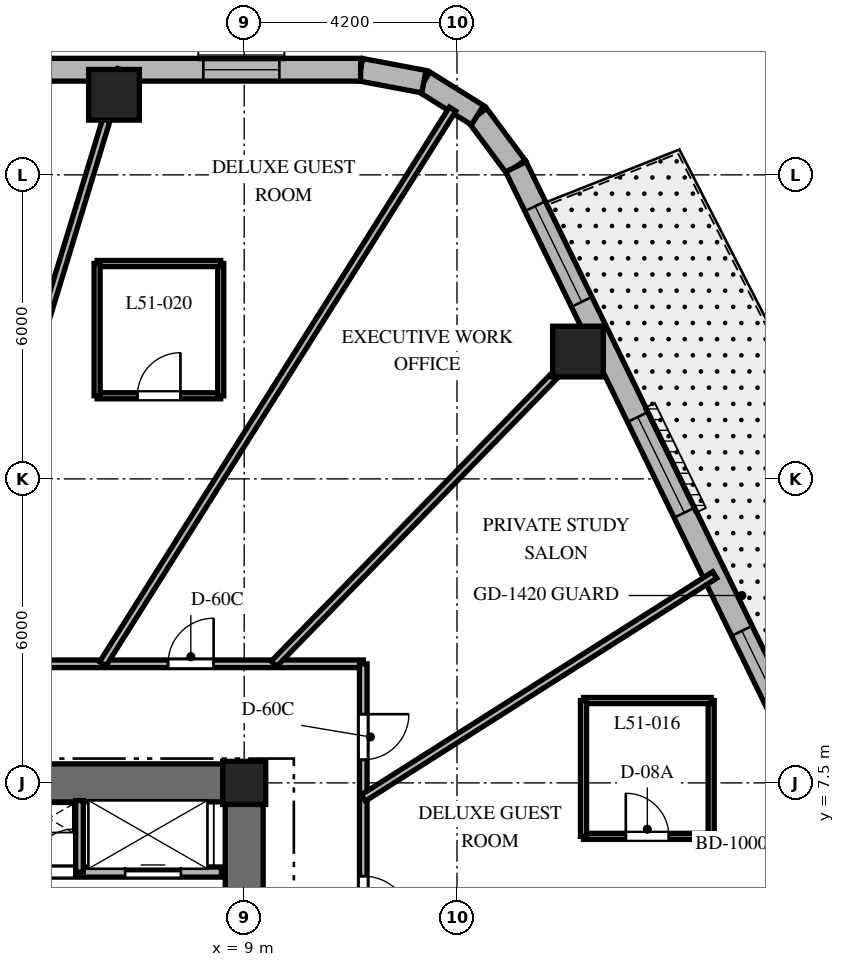
"""IFC4 building model, lengths in metres.
Left out: names, types, materials, properties, quantities, classifications, styles, units other than length and angle.
Written with IfcOpenShell. Run it as: python <this file> out.ifc"""

import sys

from ifc_helpers import new_model, si_unit, direction, frame, frame_2d, origin, origin_2d, place, context, subcontext, project, spatial, rectangle, extrude, element, fill, save


model = new_model("IFC4")
c1 = context("Model", 3, precision=1e-05, world=origin(), true_north=direction((0.0, 1.0)))
c2 = subcontext(c1, "Body", "Model", "MODEL_VIEW")
j1 = project(units=[si_unit("LENGTHUNIT", "METRE"), si_unit("PLANEANGLEUNIT", "RADIAN")], contexts=[c1])
p1 = place(None, origin())
s1 = spatial("IfcSite", under=j1, at=p1, CompositionType="ELEMENT")
p2 = place(p1, origin())
s2 = spatial("IfcBuilding", under=s1, at=p2, CompositionType="ELEMENT")
p3 = place(p2, frame((0.0, 0.0, 206.5)))
s3 = spatial("IfcBuildingStorey", under=s2, at=p3, CompositionType="ELEMENT", Elevation=206.5)
p4 = place(p3, frame((1.85, 7.5, 0.0), z_axis=(0.0, 0.0, 1.0), x_axis=(1.0, 0.0, 0.0)))
e1 = element("IfcWall", 1, at=p4, inside=s3, PredefinedType="SHEAR", context=c2, shape_type="SweptSolid", body=[
    extrude(rectangle(XDim=7.525, YDim=0.75, at=frame_2d((3.762, 0.0))), origin(), (0.0, 0.0, 1.0), 3.8),
])
p5 = place(p3, frame((9.0, -7.125, 0.0), z_axis=(0.0, 0.0, 1.0), x_axis=(0.0, 1.0, 0.0)))
e2 = element("IfcWall", 2, at=p5, inside=s3, PredefinedType="SHEAR", context=c2, shape_type="SweptSolid", body=[
    extrude(rectangle(XDim=14.25, YDim=0.75, at=frame_2d((7.125, 0.0))), origin(), (0.0, 0.0, 1.0), 3.8),
])
p6 = place(p5, frame((10.25, 0.0, 0.0)))
e3 = element("IfcOpeningElement", 3, at=p6, cuts=e2, PredefinedType="OPENING", context=c2, shape_type="SweptSolid", body=[
    extrude(rectangle(XDim=1.05, YDim=2.15, at=frame_2d((0.525, 1.075))), frame((0.0, 0.385, 0.0), z_axis=(0.0, -1.0, 0.0), x_axis=(1.0, 0.0, 0.0)), (0.0, 0.0, 1.0), 0.77),
])
p7 = place(p3, frame((9.0, 7.5, 0.0), z_axis=(0.0, 0.0, 1.0), x_axis=(1.0, 0.0, 0.0)))
e4 = element("IfcColumn", 4, at=p7, inside=s3, PredefinedType="COLUMN", context=c2, shape_type="SweptSolid", body=[
    extrude(rectangle(XDim=0.85, YDim=0.85, at=origin_2d()), origin(), (0.0, 0.0, 1.0), 3.8),
])
for number, where, z_axis, x_axis in (
    (5, (15.587, 16.013, 0.0), (0.0, 0.0, 1.0), (1.0, 0.0, 0.0)),
    (6, (6.43, 21.08, 0.0), (0.0, 0.0, 1.0), (1.0, 0.0, 0.0)),
):
    element("IfcColumn", number, at=place(p3, frame(where, z_axis=z_axis, x_axis=x_axis)), inside=s3, PredefinedType="COLUMN", context=c2, shape_type="SweptSolid", body=[
        extrude(rectangle(XDim=1.0, YDim=1.0, at=origin_2d()), origin(), (0.0, 0.0, 1.0), 3.8),
    ])
p8 = place(p3, frame((14.362, 19.658, 0.0), z_axis=(0.0, 0.0, 1.0), x_axis=(-0.596642462792, 0.80250717853, 0.0)))
e7 = element("IfcWall", 7, at=p8, inside=s3, PredefinedType="SOLIDWALL", context=c2, shape_type="SweptSolid", body=[
    extrude(rectangle(XDim=1.27, YDim=0.45, at=frame_2d((0.635, 0.0))), origin(), (0.0, 0.0, 1.0), 3.5),
])
p9 = place(p3, frame((13.604, 20.678, 0.0), z_axis=(0.0, 0.0, 1.0), x_axis=(-0.847910404124, 0.53013955387, 0.0)))
e8 = element("IfcWall", 8, at=p9, inside=s3, PredefinedType="SOLIDWALL", context=c2, shape_type="SweptSolid", body=[
    extrude(rectangle(XDim=1.249, YDim=0.45, at=frame_2d((0.624, 0.0))), origin(), (0.0, 0.0, 1.0), 3.5),
])
p10 = place(p3, frame((12.546, 21.34, 0.0), z_axis=(0.0, 0.0, 1.0), x_axis=(-0.982686750835, 0.18527479519, 0.0)))
e9 = element("IfcWall", 9, at=p10, inside=s3, PredefinedType="SOLIDWALL", context=c2, shape_type="SweptSolid", body=[
    extrude(rectangle(XDim=1.27, YDim=0.45, at=frame_2d((0.635, 0.0))), origin(), (0.0, 0.0, 1.0), 3.5),
])
p11 = place(p3, frame((22.74, 2.452, 0.0), z_axis=(0.0, 0.0, 1.0), x_axis=(-0.437753424814, 0.899095066755, 0.0)))
e10 = element("IfcWall", 10, at=p11, inside=s3, PredefinedType="SOLIDWALL", context=c2, shape_type="SweptSolid", body=[
    extrude(rectangle(XDim=19.137, YDim=0.45, at=frame_2d((9.569, 0.0))), origin(), (0.0, 0.0, 1.0), 3.5),
])
p12 = place(p11, frame((4.763, 0.0, 0.0)))
e11 = element("IfcOpeningElement", 11, at=p12, cuts=e10, PredefinedType="OPENING", context=c2, shape_type="SweptSolid", body=[
    extrude(rectangle(XDim=1.0, YDim=2.15, at=frame_2d((0.5, 1.075))), frame((0.0, 0.235, 0.0), z_axis=(0.0, -1.0, 0.0), x_axis=(1.0, 0.0, 0.0)), (0.0, 0.0, 1.0), 0.47),
])
p13 = place(p11, frame((0.916, 0.0, 0.8)))
e12 = element("IfcOpeningElement", 12, at=p13, cuts=e10, PredefinedType="OPENING", context=c2, shape_type="SweptSolid", body=[
    extrude(rectangle(XDim=2.1, YDim=1.85, at=frame_2d((1.05, 0.925))), frame((0.0, 0.235, 0.0), z_axis=(0.0, -1.0, 0.0), x_axis=(1.0, 0.0, 0.0)), (0.0, 0.0, 1.0), 0.47),
])
p14 = place(p11, frame((6.851, 0.0, 0.8)))
e13 = element("IfcOpeningElement", 13, at=p14, cuts=e10, PredefinedType="OPENING", context=c2, shape_type="SweptSolid", body=[
    extrude(rectangle(XDim=2.1, YDim=1.85, at=frame_2d((1.05, 0.925))), frame((0.0, 0.235, 0.0), z_axis=(0.0, -1.0, 0.0), x_axis=(1.0, 0.0, 0.0)), (0.0, 0.0, 1.0), 0.47),
])
p15 = place(p11, frame((11.545, 0.0, 0.8)))
e14 = element("IfcOpeningElement", 14, at=p15, cuts=e10, PredefinedType="OPENING", context=c2, shape_type="SweptSolid", body=[
    extrude(rectangle(XDim=2.1, YDim=1.85, at=frame_2d((1.05, 0.925))), frame((0.0, 0.235, 0.0), z_axis=(0.0, -1.0, 0.0), x_axis=(1.0, 0.0, 0.0)), (0.0, 0.0, 1.0), 0.47),
])
p16 = place(p11, frame((16.173, 0.0, 0.8)))
e15 = element("IfcOpeningElement", 15, at=p16, cuts=e10, PredefinedType="OPENING", context=c2, shape_type="SweptSolid", body=[
    extrude(rectangle(XDim=2.1, YDim=1.85, at=frame_2d((1.05, 0.925))), frame((0.0, 0.235, 0.0), z_axis=(0.0, -1.0, 0.0), x_axis=(1.0, 0.0, 0.0)), (0.0, 0.0, 1.0), 0.47),
])
p17 = place(p3, frame((11.298, 21.575, 0.0), z_axis=(0.0, 0.0, 1.0), x_axis=(-1.0, 0.0, 0.0)))
e16 = element("IfcWall", 16, at=p17, inside=s3, PredefinedType="SOLIDWALL", context=c2, shape_type="SweptSolid", body=[
    extrude(rectangle(XDim=24.399, YDim=0.45, at=frame_2d((12.2, 0.0))), origin(), (0.0, 0.0, 1.0), 3.5),
])
p18 = place(p17, frame((1.604, 0.0, 0.8)))
e17 = element("IfcOpeningElement", 17, at=p18, cuts=e16, PredefinedType="OPENING", context=c2, shape_type="SweptSolid", body=[
    extrude(rectangle(XDim=1.5, YDim=1.8, at=frame_2d((0.75, 0.9))), frame((0.0, 0.235, 0.0), z_axis=(0.0, -1.0, 0.0), x_axis=(1.0, 0.0, 0.0)), (0.0, 0.0, 1.0), 0.47),
])
p19 = place(p17, frame((8.035, 0.0, 0.8)))
e18 = element("IfcOpeningElement", 18, at=p19, cuts=e16, PredefinedType="OPENING", context=c2, shape_type="SweptSolid", body=[
    extrude(rectangle(XDim=1.5, YDim=1.8, at=frame_2d((0.75, 0.9))), frame((0.0, 0.235, 0.0), z_axis=(0.0, -1.0, 0.0), x_axis=(1.0, 0.0, 0.0)), (0.0, 0.0, 1.0), 0.47),
])
p20 = place(p17, frame((14.788, 0.0, 0.8)))
e19 = element("IfcOpeningElement", 19, at=p20, cuts=e16, PredefinedType="OPENING", context=c2, shape_type="SweptSolid", body=[
    extrude(rectangle(XDim=1.5, YDim=1.8, at=frame_2d((0.75, 0.9))), frame((0.0, 0.235, 0.0), z_axis=(0.0, -1.0, 0.0), x_axis=(1.0, 0.0, 0.0)), (0.0, 0.0, 1.0), 0.47),
])
p21 = place(p17, frame((21.296, 0.0, 0.8)))
e20 = element("IfcOpeningElement", 20, at=p21, cuts=e16, PredefinedType="OPENING", context=c2, shape_type="SweptSolid", body=[
    extrude(rectangle(XDim=1.5, YDim=1.8, at=frame_2d((0.75, 0.9))), frame((0.0, 0.235, 0.0), z_axis=(0.0, -1.0, 0.0), x_axis=(1.0, 0.0, 0.0)), (0.0, 0.0, 1.0), 0.47),
])
p22 = place(p3, frame((4.5, 5.74, 0.0), z_axis=(0.0, 0.0, 1.0), x_axis=(1.0, 0.0, 0.0)))
e21 = element("IfcWall", 21, at=p22, inside=s3, PredefinedType="PARTITIONING", context=c2, shape_type="SweptSolid", body=[
    extrude(rectangle(XDim=4.05, YDim=0.2, at=frame_2d((2.025, 0.0))), origin(), (0.0, 0.0, 1.0), 3.5),
])
p23 = place(p22, frame((0.3, 0.0, 0.0)))
e22 = element("IfcOpeningElement", 22, at=p23, cuts=e21, PredefinedType="OPENING", context=c2, shape_type="SweptSolid", body=[
    extrude(rectangle(XDim=0.85, YDim=2.03, at=frame_2d((0.425, 1.015))), frame((0.0, 0.11, 0.0), z_axis=(0.0, -1.0, 0.0), x_axis=(1.0, 0.0, 0.0)), (0.0, 0.0, 1.0), 0.22),
])
p24 = place(p22, frame((2.15, 0.0, 0.0)))
e23 = element("IfcOpeningElement", 23, at=p24, cuts=e21, PredefinedType="OPENING", context=c2, shape_type="SweptSolid", body=[
    extrude(rectangle(XDim=1.1, YDim=2.2, at=frame_2d((0.55, 1.1))), frame((0.0, 0.11, 0.0), z_axis=(0.0, -1.0, 0.0), x_axis=(1.0, 0.0, 0.0)), (0.0, 0.0, 1.0), 0.22),
])
p25 = place(p3, frame((5.75, 5.74, 0.0), z_axis=(0.0, 0.0, 1.0), x_axis=(0.0, 1.0, 0.0)))
e24 = element("IfcWall", 24, at=p25, inside=s3, PredefinedType="PARTITIONING", context=c2, shape_type="SweptSolid", body=[
    extrude(rectangle(XDim=1.41, YDim=0.15, at=frame_2d((0.705, 0.0))), origin(), (0.0, 0.0, 1.0), 3.5),
])
p26 = place(p3, frame((0.92, 9.85, 0.0), z_axis=(0.0, 0.0, 1.0), x_axis=(1.0, 0.0, 0.0)))
e25 = element("IfcWall", 25, at=p26, inside=s3, PredefinedType="PARTITIONING", context=c2, shape_type="SweptSolid", body=[
    extrude(rectangle(XDim=10.43, YDim=0.15, at=frame_2d((5.215, 0.0))), origin(), (0.0, 0.0, 1.0), 2.99),
])
p27 = place(p26, frame((6.577, 0.0, 0.0)))
e26 = element("IfcOpeningElement", 26, at=p27, cuts=e25, PredefinedType="OPENING", context=c2, shape_type="SweptSolid", body=[
    extrude(rectangle(XDim=0.9, YDim=2.03, at=frame_2d((0.45, 1.015))), frame((0.0, 0.085, 0.0), z_axis=(0.0, -1.0, 0.0), x_axis=(1.0, 0.0, 0.0)), (0.0, 0.0, 1.0), 0.17),
])
p28 = place(p26, frame((3.234, 0.0, 0.0)))
e27 = element("IfcOpeningElement", 27, at=p28, cuts=e25, PredefinedType="OPENING", context=c2, shape_type="SweptSolid", body=[
    extrude(rectangle(XDim=0.95, YDim=2.03, at=frame_2d((0.475, 1.015))), frame((0.0, 0.085, 0.0), z_axis=(0.0, -1.0, 0.0), x_axis=(1.0, 0.0, 0.0)), (0.0, 0.0, 1.0), 0.17),
])
p29 = place(p3, frame((11.35, 9.85, 0.0), z_axis=(0.0, 0.0, 1.0), x_axis=(0.0, -1.0, 0.0)))
e28 = element("IfcWall", 28, at=p29, inside=s3, PredefinedType="PARTITIONING", context=c2, shape_type="SweptSolid", body=[
    extrude(rectangle(XDim=12.4, YDim=0.15, at=frame_2d((6.2, 0.0))), origin(), (0.0, 0.0, 1.0), 2.99),
])
p30 = place(p29, frame((7.555, 0.0, 0.0)))
e29 = element("IfcOpeningElement", 29, at=p30, cuts=e28, PredefinedType="OPENING", context=c2, shape_type="SweptSolid", body=[
    extrude(rectangle(XDim=0.95, YDim=2.03, at=frame_2d((0.475, 1.015))), frame((0.0, 0.085, 0.0), z_axis=(0.0, -1.0, 0.0), x_axis=(1.0, 0.0, 0.0)), (0.0, 0.0, 1.0), 0.17),
])
p31 = place(p29, frame((4.191, 0.0, 0.0)))
e30 = element("IfcOpeningElement", 30, at=p31, cuts=e28, PredefinedType="OPENING", context=c2, shape_type="SweptSolid", body=[
    extrude(rectangle(XDim=0.95, YDim=2.03, at=frame_2d((0.475, 1.015))), frame((0.0, 0.085, 0.0), z_axis=(0.0, -1.0, 0.0), x_axis=(1.0, 0.0, 0.0)), (0.0, 0.0, 1.0), 0.17),
])
p32 = place(p29, frame((0.994, 0.0, 0.0)))
e31 = element("IfcOpeningElement", 31, at=p32, cuts=e28, PredefinedType="OPENING", context=c2, shape_type="SweptSolid", body=[
    extrude(rectangle(XDim=0.9, YDim=2.03, at=frame_2d((0.45, 1.015))), frame((0.0, 0.085, 0.0), z_axis=(0.0, -1.0, 0.0), x_axis=(1.0, 0.0, 0.0)), (0.0, 0.0, 1.0), 0.17),
])
p33 = place(p29, frame((10.144, 0.0, 0.0)))
e32 = element("IfcOpeningElement", 32, at=p33, cuts=e28, PredefinedType="OPENING", context=c2, shape_type="SweptSolid", body=[
    extrude(rectangle(XDim=0.95, YDim=2.03, at=frame_2d((0.475, 1.015))), frame((0.0, 0.085, 0.0), z_axis=(0.0, -1.0, 0.0), x_axis=(1.0, 0.0, 0.0)), (0.0, 0.0, 1.0), 0.17),
])
p34 = place(p3, frame((11.35, 3.121, 0.0), z_axis=(0.0, 0.0, 1.0), x_axis=(0.964212793822, 0.265129568758, 0.0)))
e33 = element("IfcWall", 33, at=p34, inside=s3, PredefinedType="PARTITIONING", context=c2, shape_type="SweptSolid", body=[
    extrude(rectangle(XDim=10.12, YDim=0.15, at=frame_2d((5.06, 0.0))), origin(), (0.0, 0.0, 1.0), 2.74),
])
p35 = place(p3, frame((11.35, 7.202, 0.0), z_axis=(0.0, 0.0, 1.0), x_axis=(0.844364592263, 0.535769013039, 0.0)))
e34 = element("IfcWall", 34, at=p35, inside=s3, PredefinedType="PARTITIONING", context=c2, shape_type="SweptSolid", body=[
    extrude(rectangle(XDim=8.213, YDim=0.15, at=frame_2d((4.106, 0.0))), origin(), (0.0, 0.0, 1.0), 2.74),
])
p36 = place(p3, frame((9.588, 9.85, 0.0), z_axis=(0.0, 0.0, 1.0), x_axis=(0.697519469595, 0.716565830567, 0.0)))
e35 = element("IfcWall", 35, at=p36, inside=s3, PredefinedType="PARTITIONING", context=c2, shape_type="SweptSolid", body=[
    extrude(rectangle(XDim=9.126, YDim=0.15, at=frame_2d((4.563, 0.0))), origin(), (0.0, 0.0, 1.0), 2.74),
])
p37 = place(p3, frame((6.21, 9.85, 0.0), z_axis=(0.0, 0.0, 1.0), x_axis=(0.533335553786, 0.84590376939, 0.0)))
e36 = element("IfcWall", 36, at=p37, inside=s3, PredefinedType="PARTITIONING", context=c2, shape_type="SweptSolid", body=[
    extrude(rectangle(XDim=12.941, YDim=0.15, at=frame_2d((6.47, 0.0))), origin(), (0.0, 0.0, 1.0), 2.74),
])
p38 = place(p3, frame((3.004, 9.85, 0.0), z_axis=(0.0, 0.0, 1.0), x_axis=(0.291775760688, 0.956486751333, 0.0)))
e37 = element("IfcWall", 37, at=p38, inside=s3, PredefinedType="PARTITIONING", context=c2, shape_type="SweptSolid", body=[
    extrude(rectangle(XDim=12.258, YDim=0.15, at=frame_2d((6.129, 0.0))), origin(), (0.0, 0.0, 1.0), 2.74),
])
p39 = place(p3, frame((15.696, 6.445, 0.0), z_axis=(0.0, 0.0, 1.0), x_axis=(1.0, 0.0, 0.0)))
e38 = element("IfcWall", 38, at=p39, inside=s3, PredefinedType="PARTITIONING", context=c2, shape_type="SweptSolid", body=[
    extrude(rectangle(XDim=2.52, YDim=0.12, at=frame_2d((1.26, 0.0))), origin(), (0.0, 0.0, 1.0), 2.99),
])
p40 = place(p39, frame((0.835, 0.0, 0.0)))
e39 = element("IfcOpeningElement", 39, at=p40, cuts=e38, PredefinedType="OPENING", context=c2, shape_type="SweptSolid", body=[
    extrude(rectangle(XDim=0.85, YDim=2.03, at=frame_2d((0.425, 1.015))), frame((0.0, 0.07, 0.0), z_axis=(0.0, -1.0, 0.0), x_axis=(1.0, 0.0, 0.0)), (0.0, 0.0, 1.0), 0.14),
])
p41 = place(p3, frame((18.216, 6.445, 0.0), z_axis=(0.0, 0.0, 1.0), x_axis=(0.0, 1.0, 0.0)))
e40 = element("IfcWall", 40, at=p41, inside=s3, PredefinedType="PARTITIONING", context=c2, shape_type="SweptSolid", body=[
    extrude(rectangle(XDim=2.68, YDim=0.12, at=frame_2d((1.34, 0.0))), origin(), (0.0, 0.0, 1.0), 3.5),
])
p42 = place(p3, frame((18.216, 9.125, 0.0), z_axis=(0.0, 0.0, 1.0), x_axis=(-1.0, 0.0, 0.0)))
e41 = element("IfcWall", 41, at=p42, inside=s3, PredefinedType="PARTITIONING", context=c2, shape_type="SweptSolid", body=[
    extrude(rectangle(XDim=2.52, YDim=0.12, at=frame_2d((1.26, 0.0))), origin(), (0.0, 0.0, 1.0), 3.5),
])
p43 = place(p3, frame((15.696, 9.125, 0.0), z_axis=(0.0, 0.0, 1.0), x_axis=(0.0, -1.0, 0.0)))
e42 = element("IfcWall", 42, at=p43, inside=s3, PredefinedType="PARTITIONING", context=c2, shape_type="SweptSolid", body=[
    extrude(rectangle(XDim=2.68, YDim=0.12, at=frame_2d((1.34, 0.0))), origin(), (0.0, 0.0, 1.0), 2.99),
])
p44 = place(p3, frame((6.097, 15.14, 0.0), z_axis=(0.0, 0.0, 1.0), x_axis=(1.0, 0.0, 0.0)))
e43 = element("IfcWall", 43, at=p44, inside=s3, PredefinedType="PARTITIONING", context=c2, shape_type="SweptSolid", body=[
    extrude(rectangle(XDim=2.44, YDim=0.12, at=frame_2d((1.22, 0.0))), origin(), (0.0, 0.0, 1.0), 3.5),
])
p45 = place(p44, frame((0.795, 0.0, 0.0)))
e44 = element("IfcOpeningElement", 44, at=p45, cuts=e43, PredefinedType="OPENING", context=c2, shape_type="SweptSolid", body=[
    extrude(rectangle(XDim=0.85, YDim=2.03, at=frame_2d((0.425, 1.015))), frame((0.0, 0.07, 0.0), z_axis=(0.0, -1.0, 0.0), x_axis=(1.0, 0.0, 0.0)), (0.0, 0.0, 1.0), 0.14),
])
p46 = place(p3, frame((8.537, 15.14, 0.0), z_axis=(0.0, 0.0, 1.0), x_axis=(0.0, 1.0, 0.0)))
e45 = element("IfcWall", 45, at=p46, inside=s3, PredefinedType="PARTITIONING", context=c2, shape_type="SweptSolid", body=[
    extrude(rectangle(XDim=2.61, YDim=0.12, at=frame_2d((1.305, 0.0))), origin(), (0.0, 0.0, 1.0), 3.073),
])
p47 = place(p3, frame((8.537, 17.75, 0.0), z_axis=(0.0, 0.0, 1.0), x_axis=(-1.0, 0.0, 0.0)))
e46 = element("IfcWall", 46, at=p47, inside=s3, PredefinedType="PARTITIONING", context=c2, shape_type="SweptSolid", body=[
    extrude(rectangle(XDim=2.44, YDim=0.12, at=frame_2d((1.22, 0.0))), origin(), (0.0, 0.0, 1.0), 3.5),
])
p48 = place(p3, frame((6.097, 17.75, 0.0), z_axis=(0.0, 0.0, 1.0), x_axis=(0.0, -1.0, 0.0)))
e47 = element("IfcWall", 47, at=p48, inside=s3, PredefinedType="PARTITIONING", context=c2, shape_type="SweptSolid", body=[
    extrude(rectangle(XDim=2.61, YDim=0.12, at=frame_2d((1.305, 0.0))), origin(), (0.0, 0.0, 1.0), 2.99),
])
p49 = place(p14, origin())
e48 = element("IfcWindow", 48, at=p49, inside=s3, PartitioningType="SINGLE_PANEL", PredefinedType="WINDOW", context=c2, shape_type="SweptSolid", body=[
    extrude(rectangle(XDim=2.1, YDim=1.85, at=frame_2d((1.05, 0.925))), frame((0.0, 0.03, 0.0), z_axis=(0.0, -1.0, 0.0), x_axis=(1.0, 0.0, 0.0)), (0.0, 0.0, 1.0), 0.06),
])
fill(e13, e48)
p50 = place(p15, origin())
e49 = element("IfcWindow", 49, at=p50, inside=s3, PartitioningType="SINGLE_PANEL", PredefinedType="WINDOW", context=c2, shape_type="SweptSolid", body=[
    extrude(rectangle(XDim=2.1, YDim=1.85, at=frame_2d((1.05, 0.925))), frame((0.0, 0.03, 0.0), z_axis=(0.0, -1.0, 0.0), x_axis=(1.0, 0.0, 0.0)), (0.0, 0.0, 1.0), 0.06),
])
fill(e14, e49)
p51 = place(p16, origin())
e50 = element("IfcWindow", 50, at=p51, inside=s3, PartitioningType="SINGLE_PANEL", PredefinedType="WINDOW", context=c2, shape_type="SweptSolid", body=[
    extrude(rectangle(XDim=2.1, YDim=1.85, at=frame_2d((1.05, 0.925))), frame((0.0, 0.03, 0.0), z_axis=(0.0, -1.0, 0.0), x_axis=(1.0, 0.0, 0.0)), (0.0, 0.0, 1.0), 0.06),
])
fill(e15, e50)
p52 = place(p18, origin())
e51 = element("IfcWindow", 51, at=p52, inside=s3, PartitioningType="SINGLE_PANEL", PredefinedType="WINDOW", context=c2, shape_type="SweptSolid", body=[
    extrude(rectangle(XDim=1.5, YDim=1.8, at=frame_2d((0.75, 0.9))), frame((0.0, 0.03, 0.0), z_axis=(0.0, -1.0, 0.0), x_axis=(1.0, 0.0, 0.0)), (0.0, 0.0, 1.0), 0.06),
])
fill(e17, e51)
p53 = place(p23, origin())
e52 = element("IfcDoor", 52, at=p53, inside=s3, OperationType="SINGLE_SWING_RIGHT", PredefinedType="DOOR", context=c2, shape_type="SweptSolid", body=[
    extrude(rectangle(XDim=0.85, YDim=2.03, at=frame_2d((0.425, 1.015))), frame((0.0, 0.025, 0.0), z_axis=(0.0, -1.0, 0.0), x_axis=(1.0, 0.0, 0.0)), (0.0, 0.0, 1.0), 0.05),
])
fill(e22, e52)
p54 = place(p24, origin())
e53 = element("IfcDoor", 53, at=p54, inside=s3, OperationType="SLIDING_TO_RIGHT", PredefinedType="DOOR", context=c2, shape_type="SweptSolid", body=[
    extrude(rectangle(XDim=1.1, YDim=2.2, at=frame_2d((0.55, 1.1))), frame((0.0, 0.025, 0.0), z_axis=(0.0, -1.0, 0.0), x_axis=(1.0, 0.0, 0.0)), (0.0, 0.0, 1.0), 0.05),
])
fill(e23, e53)
p55 = place(p31, origin())
e54 = element("IfcDoor", 54, at=p55, inside=s3, OperationType="SINGLE_SWING_RIGHT", PredefinedType="DOOR", context=c2, shape_type="SweptSolid", body=[
    extrude(rectangle(XDim=0.95, YDim=2.03, at=frame_2d((0.475, 1.015))), frame((0.0, 0.025, 0.0), z_axis=(0.0, -1.0, 0.0), x_axis=(1.0, 0.0, 0.0)), (0.0, 0.0, 1.0), 0.05),
])
fill(e30, e54)
p56 = place(p40, origin())
e55 = element("IfcDoor", 55, at=p56, inside=s3, OperationType="SINGLE_SWING_LEFT", PredefinedType="DOOR", context=c2, shape_type="SweptSolid", body=[
    extrude(rectangle(XDim=0.85, YDim=2.03, at=frame_2d((0.425, 1.015))), frame((0.0, 0.025, 0.0), z_axis=(0.0, -1.0, 0.0), x_axis=(1.0, 0.0, 0.0)), (0.0, 0.0, 1.0), 0.05),
])
fill(e39, e55)
p57 = place(p32, origin())
e56 = element("IfcDoor", 56, at=p57, inside=s3, OperationType="SINGLE_SWING_LEFT", PredefinedType="DOOR", context=c2, shape_type="SweptSolid", body=[
    extrude(rectangle(XDim=0.9, YDim=2.03, at=frame_2d((0.45, 1.015))), frame((0.0, 0.025, 0.0), z_axis=(0.0, -1.0, 0.0), x_axis=(1.0, 0.0, 0.0)), (0.0, 0.0, 1.0), 0.05),
])
fill(e31, e56)
p58 = place(p27, origin())
e57 = element("IfcDoor", 57, at=p58, inside=s3, OperationType="SINGLE_SWING_RIGHT", PredefinedType="DOOR", context=c2, shape_type="SweptSolid", body=[
    extrude(rectangle(XDim=0.9, YDim=2.03, at=frame_2d((0.45, 1.015))), frame((0.0, 0.025, 0.0), z_axis=(0.0, -1.0, 0.0), x_axis=(1.0, 0.0, 0.0)), (0.0, 0.0, 1.0), 0.05),
])
fill(e26, e57)
p59 = place(p45, origin())
e58 = element("IfcDoor", 58, at=p59, inside=s3, OperationType="SINGLE_SWING_RIGHT", PredefinedType="DOOR", context=c2, shape_type="SweptSolid", body=[
    extrude(rectangle(XDim=0.85, YDim=2.03, at=frame_2d((0.425, 1.015))), frame((0.0, 0.025, 0.0), z_axis=(0.0, -1.0, 0.0), x_axis=(1.0, 0.0, 0.0)), (0.0, 0.0, 1.0), 0.05),
])
fill(e44, e58)
save(model, sys.argv[1])
